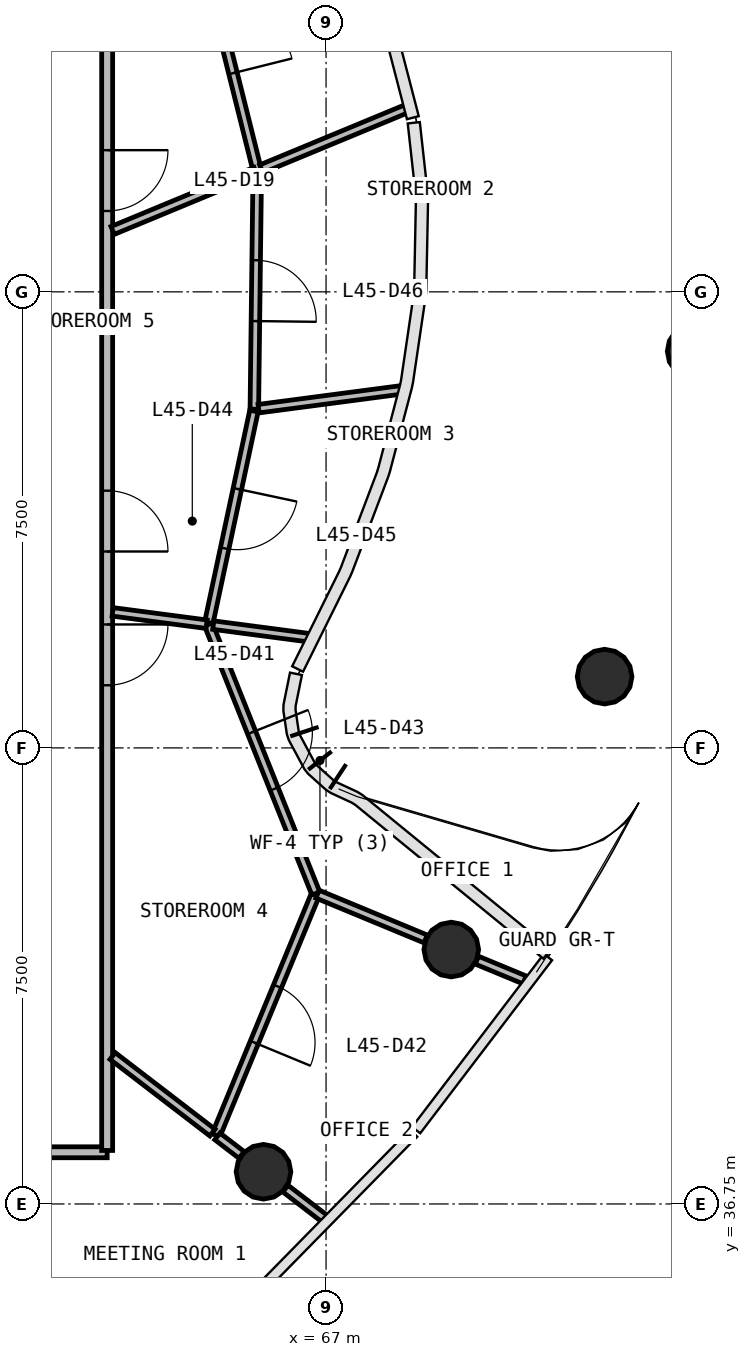
"""IFC4 building model, lengths in metres.
Left out: names, types, materials, properties, quantities, classifications, styles, units other than length and angle.
Written with IfcOpenShell. Run it as: python <this file> out.ifc"""

import sys

from ifc_helpers import new_model, si_unit, direction, frame, frame_2d, origin, origin_2d, place, context, subcontext, project, spatial, rectangle, circle, extrude, source, transform, mapped, element, fill, save


model = new_model("IFC4")
c1 = context("Model", 3, precision=1e-05, world=origin(), true_north=direction((0.0, 1.0)))
c2 = subcontext(c1, "Body", "Model", "MODEL_VIEW")
j1 = project(units=[si_unit("LENGTHUNIT", "METRE"), si_unit("PLANEANGLEUNIT", "RADIAN")], contexts=[c1])
p1 = place(None, origin())
s1 = spatial("IfcSite", under=j1, at=p1, CompositionType="ELEMENT")
p2 = place(p1, origin())
s2 = spatial("IfcBuilding", under=s1, at=p2, CompositionType="ELEMENT")
p3 = place(p2, frame((0.0, 0.0, 187.7)))
s3 = spatial("IfcBuildingStorey", under=s2, at=p3, CompositionType="ELEMENT", Elevation=187.7)
m1 = source(origin(), c2, "Body", "SweptSolid", [
    extrude(circle(Radius=0.45, at=origin_2d()), origin(), (0.0, 0.0, 1.0), 3.9),
])
for number, where, z_axis, x_axis in (
    (1, (73.062, 50.773, 0.0), (0.0, 0.0, 1.0), (1.0, 0.0, 0.0)),
    (2, (65.971, 37.28, 0.0), (0.0, 0.0, 1.0), (1.0, 0.0, 0.0)),
    (3, (69.059, 40.934, 0.0), (0.0, 0.0, 1.0), (1.0, 0.0, 0.0)),
    (4, (71.581, 45.422, 0.0), (0.0, 0.0, 1.0), (1.0, 0.0, 0.0)),
):
    element("IfcColumn", number, at=place(p3, frame(where, z_axis=z_axis, x_axis=x_axis)), inside=s3, PredefinedType="COLUMN", context=c2, shape_type="MappedRepresentation", body=[
        mapped(m1, transform((0.0, 0.0, 0.0), scale=1.0)),
    ])
p4 = place(p3, frame((63.4, 37.6, 0.0), z_axis=(0.0, 0.0, 1.0), x_axis=(-1.0, 0.0, 0.0)))
e5 = element("IfcWall", 5, at=p4, inside=s3, PredefinedType="PARTITIONING", context=c2, shape_type="SweptSolid", body=[
    extrude(rectangle(XDim=22.8, YDim=0.18, at=frame_2d((11.4, 0.0))), origin(), (0.0, 0.0, 1.0), 2.88),
])
p5 = place(p4, frame((10.95, 0.0, 0.0)))
e6 = element("IfcOpeningElement", 6, at=p5, cuts=e5, PredefinedType="OPENING", context=c2, shape_type="SweptSolid", body=[
    extrude(rectangle(XDim=1.0, YDim=2.1, at=frame_2d((0.5, 1.05))), frame((0.0, 0.1, 0.0), z_axis=(0.0, -1.0, 0.0), x_axis=(1.0, 0.0, 0.0)), (0.0, 0.0, 1.0), 0.2),
])
p6 = place(p4, frame((8.75, 0.0, 0.0)))
e7 = element("IfcOpeningElement", 7, at=p6, cuts=e5, PredefinedType="OPENING", context=c2, shape_type="SweptSolid", body=[
    extrude(rectangle(XDim=1.0, YDim=2.1, at=frame_2d((0.5, 1.05))), frame((0.0, 0.1, 0.0), z_axis=(0.0, -1.0, 0.0), x_axis=(1.0, 0.0, 0.0)), (0.0, 0.0, 1.0), 0.2),
])
p7 = place(p4, frame((1.95, 0.0, 0.0)))
e8 = element("IfcOpeningElement", 8, at=p7, cuts=e5, PredefinedType="OPENING", context=c2, shape_type="SweptSolid", body=[
    extrude(rectangle(XDim=1.0, YDim=2.1, at=frame_2d((0.5, 1.05))), frame((0.0, 0.1, 0.0), z_axis=(0.0, -1.0, 0.0), x_axis=(1.0, 0.0, 0.0)), (0.0, 0.0, 1.0), 0.2),
])
p8 = place(p3, frame((63.4, 58.37, 0.0), z_axis=(0.0, 0.0, 1.0), x_axis=(0.0, -1.0, 0.0)))
e9 = element("IfcWall", 9, at=p8, inside=s3, PredefinedType="PARTITIONING", context=c2, shape_type="SweptSolid", body=[
    extrude(rectangle(XDim=20.74, YDim=0.18, at=frame_2d((10.37, 0.0))), origin(), (0.0, 0.0, 1.0), 2.88),
])
p9 = place(p8, frame((4.29, 0.0, 0.0)))
e10 = element("IfcOpeningElement", 10, at=p9, cuts=e9, PredefinedType="OPENING", context=c2, shape_type="SweptSolid", body=[
    extrude(rectangle(XDim=1.0, YDim=2.1, at=frame_2d((0.5, 1.05))), frame((0.0, 0.1, 0.0), z_axis=(0.0, -1.0, 0.0), x_axis=(1.0, 0.0, 0.0)), (0.0, 0.0, 1.0), 0.2),
])
p10 = place(p8, frame((12.09, 0.0, 0.0)))
e11 = element("IfcOpeningElement", 11, at=p10, cuts=e9, PredefinedType="OPENING", context=c2, shape_type="SweptSolid", body=[
    extrude(rectangle(XDim=1.0, YDim=2.1, at=frame_2d((0.5, 1.05))), frame((0.0, 0.1, 0.0), z_axis=(0.0, -1.0, 0.0), x_axis=(1.0, 0.0, 0.0)), (0.0, 0.0, 1.0), 0.2),
])
p11 = place(p8, frame((9.89, 0.0, 0.0)))
e12 = element("IfcOpeningElement", 12, at=p11, cuts=e9, PredefinedType="OPENING", context=c2, shape_type="SweptSolid", body=[
    extrude(rectangle(XDim=1.0, YDim=2.1, at=frame_2d((0.5, 1.05))), frame((0.0, 0.1, 0.0), z_axis=(0.0, -1.0, 0.0), x_axis=(1.0, 0.0, 0.0)), (0.0, 0.0, 1.0), 0.2),
])
p12 = place(p3, frame((65.066, 46.28, 0.0), z_axis=(0.0, 0.0, 1.0), x_axis=(0.370851521152, -0.928692171421, 0.0)))
e13 = element("IfcWall", 13, at=p12, inside=s3, PredefinedType="PARTITIONING", context=c2, shape_type="SweptSolid", body=[
    extrude(rectangle(XDim=4.763, YDim=0.14, at=frame_2d((2.381, 0.0))), origin(), (0.0, 0.0, 1.0), 2.88),
])
p13 = place(p12, frame((1.913, 0.0, 0.0)))
e14 = element("IfcOpeningElement", 14, at=p13, cuts=e13, PredefinedType="OPENING", context=c2, shape_type="SweptSolid", body=[
    extrude(rectangle(XDim=1.0, YDim=2.1, at=frame_2d((0.5, 1.05))), frame((0.0, 0.08, 0.0), z_axis=(0.0, -1.0, 0.0), x_axis=(1.0, 0.0, 0.0)), (0.0, 0.0, 1.0), 0.16),
])
p14 = place(p3, frame((66.821, 41.829, 0.0), z_axis=(0.0, 0.0, 1.0), x_axis=(-0.38185883611, -0.924220660494, 0.0)))
e15 = element("IfcWall", 15, at=p14, inside=s3, PredefinedType="PARTITIONING", context=c2, shape_type="SweptSolid", body=[
    extrude(rectangle(XDim=4.273, YDim=0.14, at=frame_2d((2.136, 0.0))), origin(), (0.0, 0.0, 1.0), 2.88),
])
p15 = place(p14, frame((1.623, 0.0, 0.0)))
e16 = element("IfcOpeningElement", 16, at=p15, cuts=e15, PredefinedType="OPENING", context=c2, shape_type="SweptSolid", body=[
    extrude(rectangle(XDim=1.0, YDim=2.1, at=frame_2d((0.5, 1.05))), frame((0.0, 0.08, 0.0), z_axis=(0.0, -1.0, 0.0), x_axis=(1.0, 0.0, 0.0)), (0.0, 0.0, 1.0), 0.16),
])
p16 = place(p3, frame((64.842, 57.854, 0.0), z_axis=(0.0, 0.0, 1.0), x_axis=(0.2424271277, -0.970169618033, 0.0)))
e17 = element("IfcWall", 17, at=p16, inside=s3, PredefinedType="PARTITIONING", context=c2, shape_type="SweptSolid", body=[
    extrude(rectangle(XDim=4.236, YDim=0.14, at=frame_2d((2.118, 0.0))), origin(), (0.0, 0.0, 1.0), 2.88),
])
p17 = place(p16, frame((1.586, 0.0, 0.0)))
e18 = element("IfcOpeningElement", 18, at=p17, cuts=e17, PredefinedType="OPENING", context=c2, shape_type="SweptSolid", body=[
    extrude(rectangle(XDim=1.0, YDim=2.1, at=frame_2d((0.5, 1.05))), frame((0.0, 0.08, 0.0), z_axis=(0.0, -1.0, 0.0), x_axis=(1.0, 0.0, 0.0)), (0.0, 0.0, 1.0), 0.16),
])
p18 = place(p3, frame((65.868, 53.715, 0.0), z_axis=(0.0, 0.0, 1.0), x_axis=(-0.01234705924, -0.999923772159, 0.0)))
e19 = element("IfcWall", 19, at=p18, inside=s3, PredefinedType="PARTITIONING", context=c2, shape_type="SweptSolid", body=[
    extrude(rectangle(XDim=3.895, YDim=0.14, at=frame_2d((1.948, 0.0))), origin(), (0.0, 0.0, 1.0), 2.88),
])
p19 = place(p18, frame((1.446, 0.0, 0.0)))
e20 = element("IfcOpeningElement", 20, at=p19, cuts=e19, PredefinedType="OPENING", context=c2, shape_type="SweptSolid", body=[
    extrude(rectangle(XDim=1.0, YDim=2.1, at=frame_2d((0.5, 1.05))), frame((0.0, 0.08, 0.0), z_axis=(0.0, -1.0, 0.0), x_axis=(1.0, 0.0, 0.0)), (0.0, 0.0, 1.0), 0.16),
])
p20 = place(p3, frame((65.814, 49.79, 0.0), z_axis=(0.0, 0.0, 1.0), x_axis=(-0.208460885898, -0.978030704554, 0.0)))
e21 = element("IfcWall", 21, at=p20, inside=s3, PredefinedType="PARTITIONING", context=c2, shape_type="SweptSolid", body=[
    extrude(rectangle(XDim=3.559, YDim=0.14, at=frame_2d((1.78, 0.0))), origin(), (0.0, 0.0, 1.0), 2.88),
])
p21 = place(p20, frame((1.309, 0.0, 0.0)))
e22 = element("IfcOpeningElement", 22, at=p21, cuts=e21, PredefinedType="OPENING", context=c2, shape_type="SweptSolid", body=[
    extrude(rectangle(XDim=1.0, YDim=2.1, at=frame_2d((0.5, 1.05))), frame((0.0, 0.08, 0.0), z_axis=(0.0, -1.0, 0.0), x_axis=(1.0, 0.0, 0.0)), (0.0, 0.0, 1.0), 0.16),
])
p22 = place(p3, frame((65.934, 53.772, 0.0), z_axis=(0.0, 0.0, 1.0), x_axis=(0.923877293678, 0.382688837341, 0.0)))
e23 = element("IfcWall", 23, at=p22, inside=s3, PredefinedType="PARTITIONING", context=c2, shape_type="SweptSolid", body=[
    extrude(rectangle(XDim=2.602, YDim=0.14, at=frame_2d((1.301, 0.0))), origin(), (0.0, 0.0, 1.0), 2.88),
])
p23 = place(p3, frame((63.49, 52.759, 0.0), z_axis=(0.0, 0.0, 1.0), x_axis=(0.923889395606, 0.382659619881, 0.0)))
e24 = element("IfcWall", 24, at=p23, inside=s3, PredefinedType="PARTITIONING", context=c2, shape_type="SweptSolid", body=[
    extrude(rectangle(XDim=2.545, YDim=0.14, at=frame_2d((1.272, 0.0))), origin(), (0.0, 0.0, 1.0), 2.88),
])
p24 = place(p3, frame((65.89, 49.829, 0.0), z_axis=(0.0, 0.0, 1.0), x_axis=(0.991435354672, 0.130598382477, 0.0)))
e25 = element("IfcWall", 25, at=p24, inside=s3, PredefinedType="PARTITIONING", context=c2, shape_type="SweptSolid", body=[
    extrude(rectangle(XDim=2.37, YDim=0.14, at=frame_2d((1.185, 0.0))), origin(), (0.0, 0.0, 1.0), 2.88),
])
p25 = place(p3, frame((63.49, 39.183, 0.0), z_axis=(0.0, 0.0, 1.0), x_axis=(0.793382212358, -0.608723800351, 0.0)))
e26 = element("IfcWall", 26, at=p25, inside=s3, PredefinedType="PARTITIONING", context=c2, shape_type="SweptSolid", body=[
    extrude(rectangle(XDim=2.069, YDim=0.14, at=frame_2d((1.035, 0.0))), origin(), (0.0, 0.0, 1.0), 2.88),
])
p26 = place(p3, frame((66.86, 41.845, 0.0), z_axis=(0.0, 0.0, 1.0), x_axis=(0.923870050537, -0.382706323075, 0.0)))
e27 = element("IfcWall", 27, at=p26, inside=s3, PredefinedType="PARTITIONING", context=c2, shape_type="SweptSolid", body=[
    extrude(rectangle(XDim=1.926, YDim=0.14, at=frame_2d((0.963, 0.0))), origin(), (0.0, 0.0, 1.0), 2.88),
])
p27 = place(p3, frame((65.145, 46.269, 0.0), z_axis=(0.0, 0.0, 1.0), x_axis=(0.991451698316, -0.130474249971, 0.0)))
e28 = element("IfcWall", 28, at=p27, inside=s3, PredefinedType="PARTITIONING", context=c2, shape_type="SweptSolid", body=[
    extrude(rectangle(XDim=1.6, YDim=0.14, at=frame_2d((0.8, 0.0))), origin(), (0.0, 0.0, 1.0), 2.88),
])
p28 = place(p3, frame((63.49, 46.487, 0.0), z_axis=(0.0, 0.0, 1.0), x_axis=(0.991437233218, -0.130584120737, 0.0)))
e29 = element("IfcWall", 29, at=p28, inside=s3, PredefinedType="PARTITIONING", context=c2, shape_type="SweptSolid", body=[
    extrude(rectangle(XDim=1.559, YDim=0.14, at=frame_2d((0.78, 0.0))), origin(), (0.0, 0.0, 1.0), 2.88),
])
p29 = place(p3, frame((69.48, 40.76, 0.0), z_axis=(0.0, 0.0, 1.0), x_axis=(0.923967777062, -0.38247032166, 0.0)))
e30 = element("IfcWall", 30, at=p29, inside=s3, PredefinedType="PARTITIONING", context=c2, shape_type="SweptSolid", body=[
    extrude(rectangle(XDim=0.849, YDim=0.14, at=frame_2d((0.424, 0.0))), origin(), (0.0, 0.0, 1.0), 2.88),
])
p30 = place(p3, frame((66.332, 37.003, 0.0), z_axis=(0.0, 0.0, 1.0), x_axis=(0.793336246331, -0.608783705644, 0.0)))
e31 = element("IfcWall", 31, at=p30, inside=s3, PredefinedType="PARTITIONING", context=c2, shape_type="SweptSolid", body=[
    extrude(rectangle(XDim=0.815, YDim=0.14, at=frame_2d((0.407, 0.0))), origin(), (0.0, 0.0, 1.0), 2.88),
])
p31 = place(p3, frame((65.213, 37.861, 0.0), z_axis=(0.0, 0.0, 1.0), x_axis=(0.793402374063, -0.608697521624, 0.0)))
e32 = element("IfcWall", 32, at=p31, inside=s3, PredefinedType="PARTITIONING", context=c2, shape_type="SweptSolid", body=[
    extrude(rectangle(XDim=0.501, YDim=0.14, at=frame_2d((0.25, 0.0))), origin(), (0.0, 0.0, 1.0), 2.88),
])
m2 = source(origin(), c2, "Body", "SweptSolid", [
    extrude(rectangle(XDim=1.0, YDim=2.1, at=frame_2d((0.5, 1.05))), frame((0.0, 0.025, 0.0), z_axis=(0.0, -1.0, 0.0), x_axis=(1.0, 0.0, 0.0)), (0.0, 0.0, 1.0), 0.05),
])
p32 = place(p9, origin())
e33 = element("IfcDoor", 33, at=p32, inside=s3, OperationType="SINGLE_SWING_LEFT", PredefinedType="DOOR", context=c2, shape_type="MappedRepresentation", body=[
    mapped(m2, transform((0.0, 0.0, 0.0), scale=1.0)),
])
fill(e10, e33)
p33 = place(p17, origin())
e34 = element("IfcDoor", 34, at=p33, inside=s3, OperationType="SINGLE_SWING_RIGHT", PredefinedType="DOOR", context=c2, shape_type="MappedRepresentation", body=[
    mapped(m2, transform((0.0, 0.0, 0.0), scale=1.0)),
])
fill(e18, e34)
p34 = place(p10, origin())
e35 = element("IfcDoor", 35, at=p34, inside=s3, OperationType="SINGLE_SWING_LEFT", PredefinedType="DOOR", context=c2, shape_type="MappedRepresentation", body=[
    mapped(m2, transform((0.0, 0.0, 0.0), scale=1.0)),
])
fill(e11, e35)
p35 = place(p15, origin())
e36 = element("IfcDoor", 36, at=p35, inside=s3, OperationType="SINGLE_SWING_RIGHT", PredefinedType="DOOR", context=c2, shape_type="MappedRepresentation", body=[
    mapped(m2, transform((0.0, 0.0, 0.0), scale=1.0)),
])
fill(e16, e36)
p36 = place(p13, origin())
e37 = element("IfcDoor", 37, at=p36, inside=s3, OperationType="SINGLE_SWING_LEFT", PredefinedType="DOOR", context=c2, shape_type="MappedRepresentation", body=[
    mapped(m2, transform((0.0, 0.0, 0.0), scale=1.0)),
])
fill(e14, e37)
p37 = place(p11, origin())
e38 = element("IfcDoor", 38, at=p37, inside=s3, OperationType="SINGLE_SWING_RIGHT", PredefinedType="DOOR", context=c2, shape_type="MappedRepresentation", body=[
    mapped(m2, transform((0.0, 0.0, 0.0), scale=1.0)),
])
fill(e12, e38)
p38 = place(p21, origin())
e39 = element("IfcDoor", 39, at=p38, inside=s3, OperationType="SINGLE_SWING_LEFT", PredefinedType="DOOR", context=c2, shape_type="MappedRepresentation", body=[
    mapped(m2, transform((0.0, 0.0, 0.0), scale=1.0)),
])
fill(e22, e39)
p39 = place(p19, origin())
e40 = element("IfcDoor", 40, at=p39, inside=s3, OperationType="SINGLE_SWING_RIGHT", PredefinedType="DOOR", context=c2, shape_type="MappedRepresentation", body=[
    mapped(m2, transform((0.0, 0.0, 0.0), scale=1.0)),
])
fill(e20, e40)
save(model, sys.argv[1])
